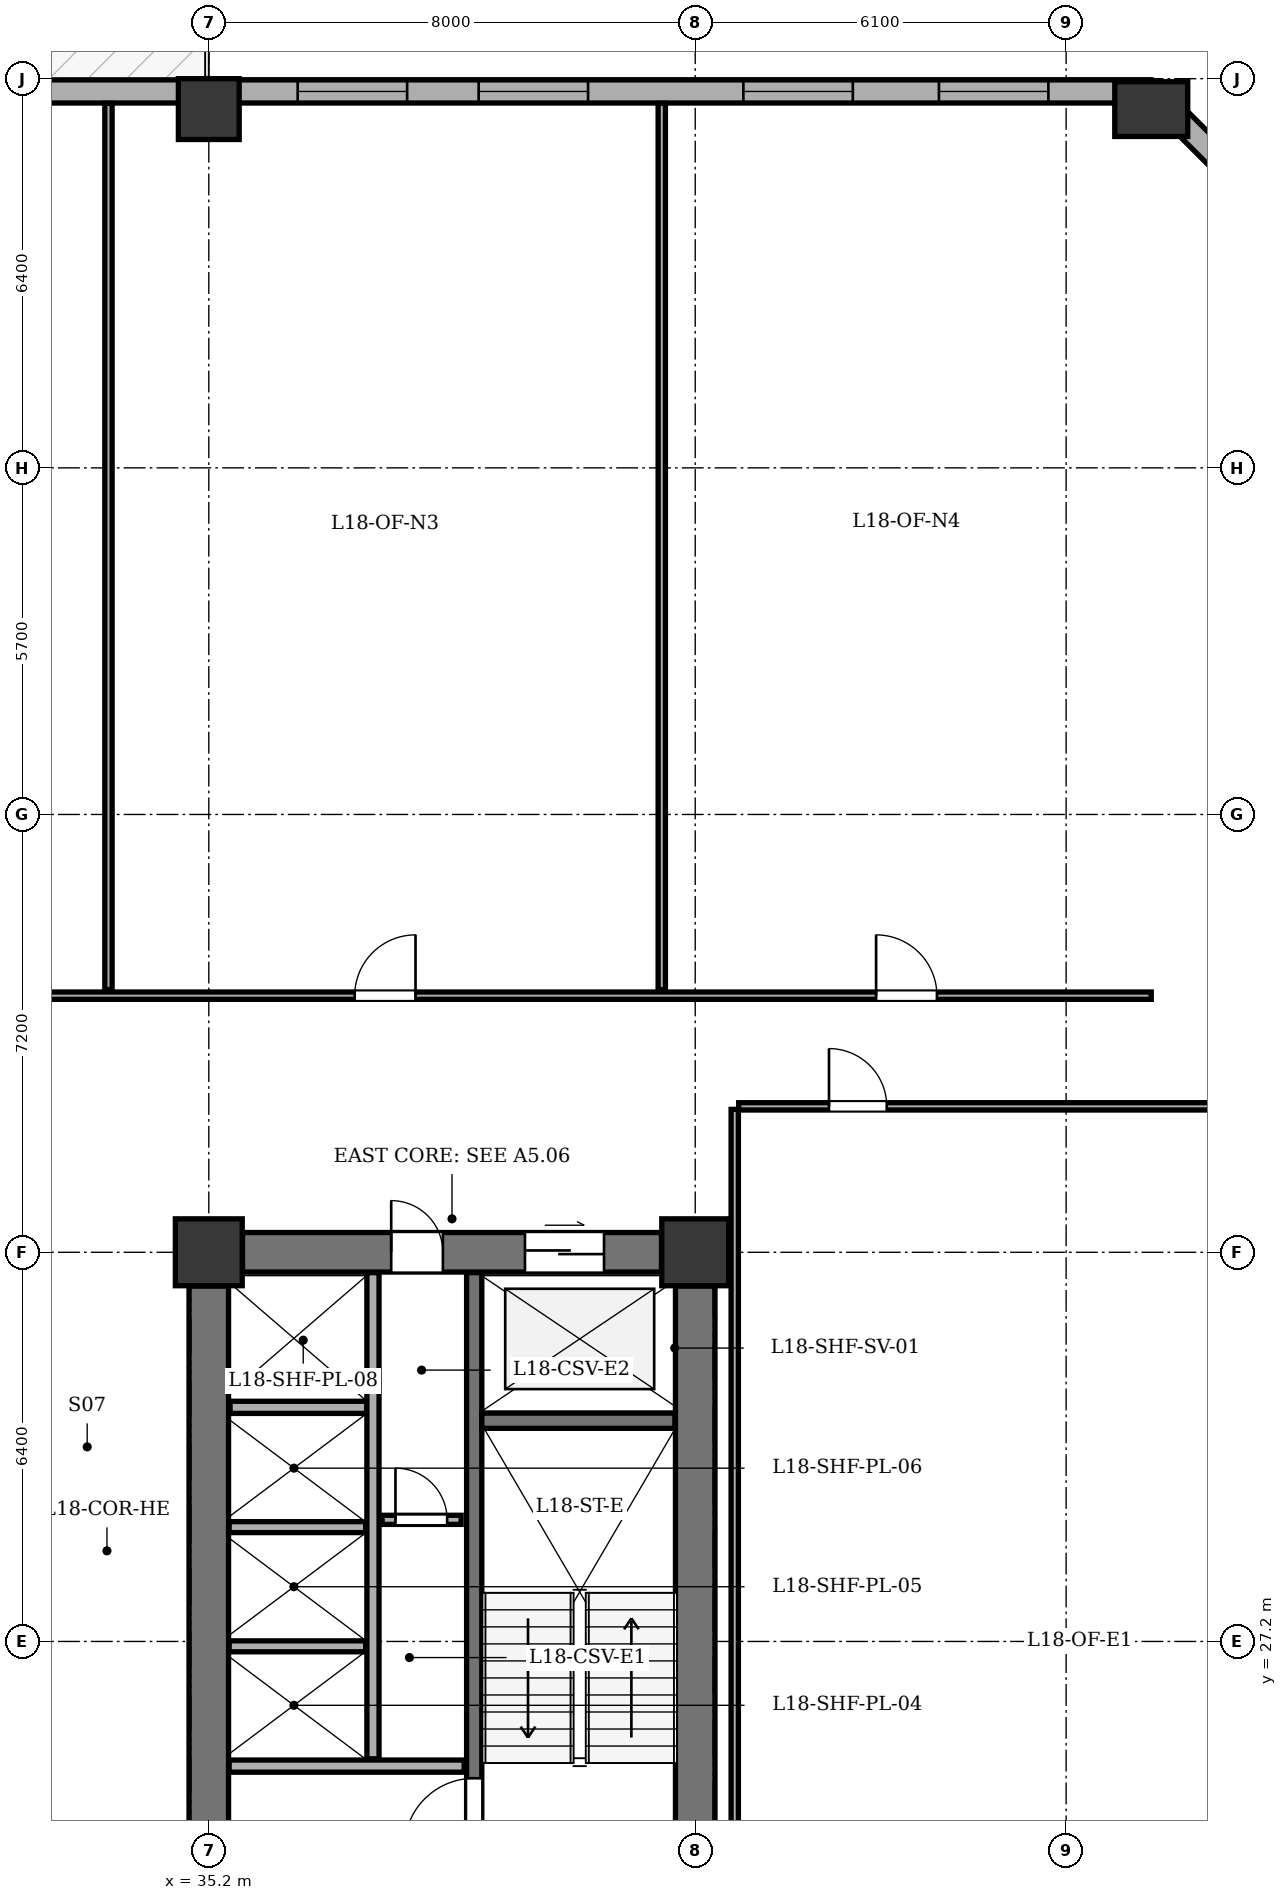
"""IFC4 building model, lengths in metres.
Left out: names, types, materials, properties, quantities, classifications, styles, units other than length and angle.
Written with IfcOpenShell. Run it as: python <this file> out.ifc"""

import sys

from ifc_helpers import new_model, si_unit, direction, frame, frame_2d, origin, origin_2d, place, context, subcontext, project, spatial, rectangle, extrude, element, fill, save


model = new_model("IFC4")
c1 = context("Model", 3, precision=1e-05, world=origin(), true_north=direction((0.0, 1.0)))
c2 = subcontext(c1, "Body", "Model", "MODEL_VIEW")
j1 = project(units=[si_unit("LENGTHUNIT", "METRE"), si_unit("PLANEANGLEUNIT", "RADIAN")], contexts=[c1])
p1 = place(None, origin())
s1 = spatial("IfcSite", under=j1, at=p1, CompositionType="ELEMENT")
p2 = place(p1, origin())
s2 = spatial("IfcBuilding", under=s1, at=p2, CompositionType="ELEMENT")
p3 = place(p2, frame((0.0, 0.0, 75.0)))
s3 = spatial("IfcBuildingStorey", under=s2, at=p3, CompositionType="ELEMENT", Elevation=75.0)
for number, where, z_axis, x_axis in (
    (1, (35.2, 33.6, 0.0), (0.0, 0.0, 1.0), (1.0, 0.0, 0.0)),
    (2, (43.2, 33.6, 0.0), (0.0, 0.0, 1.0), (1.0, 0.0, 0.0)),
):
    element("IfcColumn", number, at=place(p3, frame(where, z_axis=z_axis, x_axis=x_axis)), inside=s3, PredefinedType="COLUMN", context=c2, shape_type="SweptSolid", body=[
        extrude(rectangle(XDim=1.1, YDim=1.1, at=origin_2d()), origin(), (0.0, 0.0, 1.0), 3.9),
    ])
p4 = place(p3, frame((35.2, 52.4, 0.0), z_axis=(0.0, 0.0, 1.0), x_axis=(1.0, 0.0, 0.0)))
e3 = element("IfcColumn", 3, at=p4, inside=s3, PredefinedType="COLUMN", context=c2, shape_type="SweptSolid", body=[
    extrude(rectangle(XDim=1.0, YDim=1.0, at=origin_2d()), origin(), (0.0, 0.0, 1.0), 3.9),
])
p5 = place(p3, frame((50.7, 52.4, 0.0), z_axis=(0.0, 0.0, 1.0), x_axis=(1.0, 0.0, 0.0)))
e4 = element("IfcColumn", 4, at=p5, inside=s3, PredefinedType="COLUMN", context=c2, shape_type="SweptSolid", body=[
    extrude(rectangle(XDim=0.9, YDim=1.2, at=origin_2d()), origin(), (0.0, 0.0, 1.0), 3.9),
])
p6 = place(p3, frame((15.7, 52.69, 0.0), z_axis=(0.0, 0.0, 1.0), x_axis=(1.0, 0.0, 0.0)))
e5 = element("IfcWall", 5, at=p6, inside=s3, PredefinedType="STANDARD", context=c2, shape_type="SweptSolid", body=[
    extrude(rectangle(XDim=35.0, YDim=0.38, at=frame_2d((17.5, 0.0))), origin(), (0.0, 0.0, 1.0), 3.135),
])
p7 = place(p6, frame((15.6, 0.0, 0.0)))
e6 = element("IfcOpeningElement", 6, at=p7, cuts=e5, PredefinedType="OPENING", context=c2, shape_type="SweptSolid", body=[
    extrude(rectangle(XDim=1.0, YDim=2.02, at=frame_2d((0.5, 1.01))), frame((0.0, 0.2, 0.0), z_axis=(0.0, -1.0, 0.0), x_axis=(1.0, 0.0, 0.0)), (0.0, 0.0, 1.0), 0.4),
])
p8 = place(p6, frame((1.7, 0.0, 0.8)))
e7 = element("IfcOpeningElement", 7, at=p8, cuts=e5, PredefinedType="OPENING", context=c2, shape_type="SweptSolid", body=[
    extrude(rectangle(XDim=1.8, YDim=1.9, at=frame_2d((0.9, 0.95))), frame((0.0, 0.2, 0.0), z_axis=(0.0, -1.0, 0.0), x_axis=(1.0, 0.0, 0.0)), (0.0, 0.0, 1.0), 0.4),
])
p9 = place(p6, frame((6.125, 0.0, 0.8)))
e8 = element("IfcOpeningElement", 8, at=p9, cuts=e5, PredefinedType="OPENING", context=c2, shape_type="SweptSolid", body=[
    extrude(rectangle(XDim=1.5, YDim=1.9, at=frame_2d((0.75, 0.95))), frame((0.0, 0.2, 0.0), z_axis=(0.0, -1.0, 0.0), x_axis=(1.0, 0.0, 0.0)), (0.0, 0.0, 1.0), 0.4),
])
p10 = place(p6, frame((9.325, 0.0, 0.8)))
e9 = element("IfcOpeningElement", 9, at=p10, cuts=e5, PredefinedType="OPENING", context=c2, shape_type="SweptSolid", body=[
    extrude(rectangle(XDim=1.8, YDim=1.9, at=frame_2d((0.9, 0.95))), frame((0.0, 0.2, 0.0), z_axis=(0.0, -1.0, 0.0), x_axis=(1.0, 0.0, 0.0)), (0.0, 0.0, 1.0), 0.4),
])
p11 = place(p6, frame((20.962, 0.0, 0.8)))
e10 = element("IfcOpeningElement", 10, at=p11, cuts=e5, PredefinedType="OPENING", context=c2, shape_type="SweptSolid", body=[
    extrude(rectangle(XDim=1.8, YDim=1.9, at=frame_2d((0.9, 0.95))), frame((0.0, 0.2, 0.0), z_axis=(0.0, -1.0, 0.0), x_axis=(1.0, 0.0, 0.0)), (0.0, 0.0, 1.0), 0.4),
])
p12 = place(p6, frame((23.938, 0.0, 0.8)))
e11 = element("IfcOpeningElement", 11, at=p12, cuts=e5, PredefinedType="OPENING", context=c2, shape_type="SweptSolid", body=[
    extrude(rectangle(XDim=1.8, YDim=1.9, at=frame_2d((0.9, 0.95))), frame((0.0, 0.2, 0.0), z_axis=(0.0, -1.0, 0.0), x_axis=(1.0, 0.0, 0.0)), (0.0, 0.0, 1.0), 0.4),
])
p13 = place(p6, frame((28.292, 0.0, 0.8)))
e12 = element("IfcOpeningElement", 12, at=p13, cuts=e5, PredefinedType="OPENING", context=c2, shape_type="SweptSolid", body=[
    extrude(rectangle(XDim=1.8, YDim=1.9, at=frame_2d((0.9, 0.95))), frame((0.0, 0.2, 0.0), z_axis=(0.0, -1.0, 0.0), x_axis=(1.0, 0.0, 0.0)), (0.0, 0.0, 1.0), 0.4),
])
p14 = place(p6, frame((31.508, 0.0, 0.8)))
e13 = element("IfcOpeningElement", 13, at=p14, cuts=e5, PredefinedType="OPENING", context=c2, shape_type="SweptSolid", body=[
    extrude(rectangle(XDim=1.8, YDim=1.9, at=frame_2d((0.9, 0.95))), frame((0.0, 0.2, 0.0), z_axis=(0.0, -1.0, 0.0), x_axis=(1.0, 0.0, 0.0)), (0.0, 0.0, 1.0), 0.4),
])
p15 = place(p3, frame((50.7, 52.69, 0.0), z_axis=(0.0, 0.0, 1.0), x_axis=(0.707106781187, -0.707106781187, 0.0)))
e14 = element("IfcWall", 14, at=p15, inside=s3, PredefinedType="STANDARD", context=c2, shape_type="SweptSolid", body=[
    extrude(rectangle(XDim=6.774, YDim=0.38, at=frame_2d((3.387, 0.0))), origin(), (0.0, 0.0, 1.0), 3.135),
])
p16 = place(p15, frame((2.687, 0.0, 0.8)))
e15 = element("IfcOpeningElement", 15, at=p16, cuts=e14, PredefinedType="OPENING", context=c2, shape_type="SweptSolid", body=[
    extrude(rectangle(XDim=1.4, YDim=1.65, at=frame_2d((0.7, 0.825))), frame((0.0, 0.2, 0.0), z_axis=(0.0, -1.0, 0.0), x_axis=(1.0, 0.0, 0.0)), (0.0, 0.0, 1.0), 0.4),
])
p17 = place(p3, frame((43.2, 21.355, 0.0), z_axis=(0.0, 0.0, 1.0), x_axis=(0.0, 1.0, 0.0)))
e16 = element("IfcWall", 16, at=p17, inside=s3, PredefinedType="SHEAR", context=c2, shape_type="SweptSolid", body=[
    extrude(rectangle(XDim=11.69, YDim=0.65, at=frame_2d((5.845, 0.0))), origin(), (0.0, 0.0, 1.0), 3.6),
])
p18 = place(p3, frame((35.755, 33.6, 0.0), z_axis=(0.0, 0.0, 1.0), x_axis=(1.0, 0.0, 0.0)))
e17 = element("IfcWall", 17, at=p18, inside=s3, PredefinedType="SHEAR", context=c2, shape_type="SweptSolid", body=[
    extrude(rectangle(XDim=6.89, YDim=0.65, at=frame_2d((3.445, 0.0))), origin(), (0.0, 0.0, 1.0), 3.6),
])
p19 = place(p18, frame((4.645, 0.0, 0.0)))
e18 = element("IfcOpeningElement", 18, at=p19, cuts=e17, PredefinedType="OPENING", context=c2, shape_type="SweptSolid", body=[
    extrude(rectangle(XDim=1.3, YDim=2.15, at=frame_2d((0.65, 1.075))), frame((0.0, 0.335, 0.0), z_axis=(0.0, -1.0, 0.0), x_axis=(1.0, 0.0, 0.0)), (0.0, 0.0, 1.0), 0.67),
])
p20 = place(p18, frame((2.445, 0.0, 0.0)))
e19 = element("IfcOpeningElement", 19, at=p20, cuts=e17, PredefinedType="OPENING", context=c2, shape_type="SweptSolid", body=[
    extrude(rectangle(XDim=0.85, YDim=2.02, at=frame_2d((0.425, 1.01))), frame((0.0, 0.335, 0.0), z_axis=(0.0, -1.0, 0.0), x_axis=(1.0, 0.0, 0.0)), (0.0, 0.0, 1.0), 0.67),
])
p21 = place(p3, frame((35.2, 21.355, 0.0), z_axis=(0.0, 0.0, 1.0), x_axis=(0.0, 1.0, 0.0)))
e20 = element("IfcWall", 20, at=p21, inside=s3, PredefinedType="SHEAR", context=c2, shape_type="SweptSolid", body=[
    extrude(rectangle(XDim=11.69, YDim=0.65, at=frame_2d((5.845, 0.0))), origin(), (0.0, 0.0, 1.0), 3.6),
])
p22 = place(p21, frame((1.245, 0.0, 0.0)))
e21 = element("IfcOpeningElement", 21, at=p22, cuts=e20, PredefinedType="OPENING", context=c2, shape_type="SweptSolid", body=[
    extrude(rectangle(XDim=1.2, YDim=2.15, at=frame_2d((0.6, 1.075))), frame((0.0, 0.335, 0.0), z_axis=(0.0, -1.0, 0.0), x_axis=(1.0, 0.0, 0.0)), (0.0, 0.0, 1.0), 0.67),
])
p23 = place(p3, frame((39.565, 21.135, 0.0), z_axis=(0.0, 0.0, 1.0), x_axis=(0.0, 1.0, 0.0)))
e22 = element("IfcWall", 22, at=p23, inside=s3, PredefinedType="SHEAR", context=c2, shape_type="SweptSolid", body=[
    extrude(rectangle(XDim=12.13, YDim=0.25, at=frame_2d((6.065, 0.0))), origin(), (0.0, 0.0, 1.0), 3.6),
])
p24 = place(p23, frame((0.515, 0.0, 0.0)))
e23 = element("IfcOpeningElement", 23, at=p24, cuts=e22, PredefinedType="OPENING", context=c2, shape_type="SweptSolid", body=[
    extrude(rectangle(XDim=1.2, YDim=2.15, at=frame_2d((0.6, 1.075))), frame((0.0, 0.135, 0.0), z_axis=(0.0, -1.0, 0.0), x_axis=(1.0, 0.0, 0.0)), (0.0, 0.0, 1.0), 0.27),
])
p25 = place(p23, frame((2.665, 0.0, 0.0)))
e24 = element("IfcOpeningElement", 24, at=p25, cuts=e22, PredefinedType="OPENING", context=c2, shape_type="SweptSolid", body=[
    extrude(rectangle(XDim=1.15, YDim=2.15, at=frame_2d((0.575, 1.075))), frame((0.0, 0.135, 0.0), z_axis=(0.0, -1.0, 0.0), x_axis=(1.0, 0.0, 0.0)), (0.0, 0.0, 1.0), 0.27),
])
p26 = place(p3, frame((39.69, 30.83, 0.0), z_axis=(0.0, 0.0, 1.0), x_axis=(1.0, 0.0, 0.0)))
e25 = element("IfcWall", 25, at=p26, inside=s3, PredefinedType="SHEAR", context=c2, shape_type="SweptSolid", body=[
    extrude(rectangle(XDim=3.175, YDim=0.25, at=frame_2d((1.587, 0.0))), origin(), (0.0, 0.0, 1.0), 3.6),
])
p27 = place(p3, frame((35.535, 25.15, 0.0), z_axis=(0.0, 0.0, 1.0), x_axis=(1.0, 0.0, 0.0)))
e26 = element("IfcWall", 26, at=p27, inside=s3, PredefinedType="SOLIDWALL", context=c2, shape_type="SweptSolid", body=[
    extrude(rectangle(XDim=3.865, YDim=0.2, at=frame_2d((1.933, 0.0))), origin(), (0.0, 0.0, 1.0), 3.6),
])
p28 = place(p3, frame((35.55, 31.05, 0.0), z_axis=(0.0, 0.0, 1.0), x_axis=(1.0, 0.0, 0.0)))
e27 = element("IfcWall", 27, at=p28, inside=s3, PredefinedType="SOLIDWALL", context=c2, shape_type="SweptSolid", body=[
    extrude(rectangle(XDim=2.25, YDim=0.2, at=frame_2d((1.125, 0.0))), origin(), (0.0, 0.0, 1.0), 3.6),
])
p29 = place(p3, frame((37.9, 25.27, 0.0), z_axis=(0.0, 0.0, 1.0), x_axis=(0.0, 1.0, 0.0)))
e28 = element("IfcWall", 28, at=p29, inside=s3, PredefinedType="SOLIDWALL", context=c2, shape_type="SweptSolid", body=[
    extrude(rectangle(XDim=7.995, YDim=0.2, at=frame_2d((3.998, 0.0))), origin(), (0.0, 0.0, 1.0), 3.6),
])
for number, where, z_axis, x_axis in (
    (29, (35.535, 27.12, 0.0), (0.0, 0.0, 1.0), (1.0, 0.0, 0.0)),
    (30, (35.535, 29.08, 0.0), (0.0, 0.0, 1.0), (1.0, 0.0, 0.0)),
):
    element("IfcWall", number, at=place(p3, frame(where, z_axis=z_axis, x_axis=x_axis)), inside=s3, PredefinedType="PARTITIONING", context=c2, shape_type="SweptSolid", body=[
        extrude(rectangle(XDim=2.245, YDim=0.18, at=frame_2d((1.123, 0.0))), origin(), (0.0, 0.0, 1.0), 3.6),
    ])
p30 = place(p3, frame((38.05, 29.2, 0.0), z_axis=(0.0, 0.0, 1.0), x_axis=(1.0, 0.0, 0.0)))
e31 = element("IfcWall", 31, at=p30, inside=s3, PredefinedType="PARTITIONING", context=c2, shape_type="SweptSolid", body=[
    extrude(rectangle(XDim=1.3, YDim=0.15, at=frame_2d((0.65, 0.0))), origin(), (0.0, 0.0, 1.0), 3.6),
])
p31 = place(p30, frame((0.22, 0.0, 0.0)))
e32 = element("IfcOpeningElement", 32, at=p31, cuts=e31, PredefinedType="OPENING", context=c2, shape_type="SweptSolid", body=[
    extrude(rectangle(XDim=0.85, YDim=2.02, at=frame_2d((0.425, 1.01))), frame((0.0, 0.085, 0.0), z_axis=(0.0, -1.0, 0.0), x_axis=(1.0, 0.0, 0.0)), (0.0, 0.0, 1.0), 0.17),
])
p32 = place(p3, frame((15.7, 37.82, 0.0), z_axis=(0.0, 0.0, 1.0), x_axis=(1.0, 0.0, 0.0)))
e33 = element("IfcWall", 33, at=p32, inside=s3, PredefinedType="PARTITIONING", context=c2, shape_type="SweptSolid", body=[
    extrude(rectangle(XDim=35.0, YDim=0.12, at=frame_2d((17.5, 0.0))), origin(), (0.0, 0.0, 1.0), 3.6),
])
p33 = place(p32, frame((3.7, 0.0, 0.0)))
e34 = element("IfcOpeningElement", 34, at=p33, cuts=e33, PredefinedType="OPENING", context=c2, shape_type="SweptSolid", body=[
    extrude(rectangle(XDim=1.0, YDim=2.1, at=frame_2d((0.5, 1.05))), frame((0.0, 0.07, 0.0), z_axis=(0.0, -1.0, 0.0), x_axis=(1.0, 0.0, 0.0)), (0.0, 0.0, 1.0), 0.14),
])
p34 = place(p32, frame((12.625, 0.0, 0.0)))
e35 = element("IfcOpeningElement", 35, at=p34, cuts=e33, PredefinedType="OPENING", context=c2, shape_type="SweptSolid", body=[
    extrude(rectangle(XDim=1.0, YDim=2.1, at=frame_2d((0.5, 1.05))), frame((0.0, 0.07, 0.0), z_axis=(0.0, -1.0, 0.0), x_axis=(1.0, 0.0, 0.0)), (0.0, 0.0, 1.0), 0.14),
])
p35 = place(p32, frame((21.9, 0.0, 0.0)))
e36 = element("IfcOpeningElement", 36, at=p35, cuts=e33, PredefinedType="OPENING", context=c2, shape_type="SweptSolid", body=[
    extrude(rectangle(XDim=1.0, YDim=2.1, at=frame_2d((0.5, 1.05))), frame((0.0, 0.07, 0.0), z_axis=(0.0, -1.0, 0.0), x_axis=(1.0, 0.0, 0.0)), (0.0, 0.0, 1.0), 0.14),
])
p36 = place(p32, frame((30.475, 0.0, 0.0)))
e37 = element("IfcOpeningElement", 37, at=p36, cuts=e33, PredefinedType="OPENING", context=c2, shape_type="SweptSolid", body=[
    extrude(rectangle(XDim=1.0, YDim=2.1, at=frame_2d((0.5, 1.05))), frame((0.0, 0.07, 0.0), z_axis=(0.0, -1.0, 0.0), x_axis=(1.0, 0.0, 0.0)), (0.0, 0.0, 1.0), 0.14),
])
p37 = place(p3, frame((33.55, 37.92, 0.0), z_axis=(0.0, 0.0, 1.0), x_axis=(0.0, 1.0, 0.0)))
e38 = element("IfcWall", 38, at=p37, inside=s3, PredefinedType="PARTITIONING", context=c2, shape_type="SweptSolid", body=[
    extrude(rectangle(XDim=14.575, YDim=0.12, at=frame_2d((7.288, 0.0))), origin(), (0.0, 0.0, 1.0), 3.135),
])
p38 = place(p3, frame((42.65, 37.92, 0.0), z_axis=(0.0, 0.0, 1.0), x_axis=(0.0, 1.0, 0.0)))
e39 = element("IfcWall", 39, at=p38, inside=s3, PredefinedType="PARTITIONING", context=c2, shape_type="SweptSolid", body=[
    extrude(rectangle(XDim=14.575, YDim=0.12, at=frame_2d((7.288, 0.0))), origin(), (0.0, 0.0, 1.0), 3.6),
])
p39 = place(p3, frame((43.85, 18.45, 0.0), z_axis=(0.0, 0.0, 1.0), x_axis=(0.0, 1.0, 0.0)))
e40 = element("IfcWall", 40, at=p39, inside=s3, PredefinedType="PARTITIONING", context=c2, shape_type="SweptSolid", body=[
    extrude(rectangle(XDim=17.5, YDim=0.12, at=frame_2d((8.75, 0.0))), origin(), (0.0, 0.0, 1.0), 3.6),
])
p40 = place(p3, frame((43.915, 36.0, 0.0), z_axis=(0.0, 0.0, 1.0), x_axis=(1.0, 0.0, 0.0)))
e41 = element("IfcWall", 41, at=p40, inside=s3, PredefinedType="PARTITIONING", context=c2, shape_type="SweptSolid", body=[
    extrude(rectangle(XDim=11.38, YDim=0.12, at=frame_2d((5.69, 0.0))), origin(), (0.0, 0.0, 1.0), 3.6),
])
p41 = place(p40, frame((1.485, 0.0, 0.0)))
e42 = element("IfcOpeningElement", 42, at=p41, cuts=e41, PredefinedType="OPENING", context=c2, shape_type="SweptSolid", body=[
    extrude(rectangle(XDim=0.95, YDim=2.1, at=frame_2d((0.475, 1.05))), frame((0.0, 0.07, 0.0), z_axis=(0.0, -1.0, 0.0), x_axis=(1.0, 0.0, 0.0)), (0.0, 0.0, 1.0), 0.14),
])
p42 = place(p11, origin())
e43 = element("IfcWindow", 43, at=p42, inside=s3, PartitioningType="SINGLE_PANEL", PredefinedType="WINDOW", context=c2, shape_type="SweptSolid", body=[
    extrude(rectangle(XDim=1.8, YDim=1.9, at=frame_2d((0.9, 0.95))), frame((0.0, -0.01, 0.0), z_axis=(0.0, -1.0, 0.0), x_axis=(1.0, 0.0, 0.0)), (0.0, 0.0, 1.0), 0.06),
])
fill(e10, e43)
p43 = place(p12, origin())
e44 = element("IfcWindow", 44, at=p43, inside=s3, PartitioningType="SINGLE_PANEL", PredefinedType="WINDOW", context=c2, shape_type="SweptSolid", body=[
    extrude(rectangle(XDim=1.8, YDim=1.9, at=frame_2d((0.9, 0.95))), frame((0.0, -0.01, 0.0), z_axis=(0.0, -1.0, 0.0), x_axis=(1.0, 0.0, 0.0)), (0.0, 0.0, 1.0), 0.06),
])
fill(e11, e44)
p44 = place(p13, origin())
e45 = element("IfcWindow", 45, at=p44, inside=s3, PartitioningType="SINGLE_PANEL", PredefinedType="WINDOW", context=c2, shape_type="SweptSolid", body=[
    extrude(rectangle(XDim=1.8, YDim=1.9, at=frame_2d((0.9, 0.95))), frame((0.0, -0.01, 0.0), z_axis=(0.0, -1.0, 0.0), x_axis=(1.0, 0.0, 0.0)), (0.0, 0.0, 1.0), 0.06),
])
fill(e12, e45)
p45 = place(p14, origin())
e46 = element("IfcWindow", 46, at=p45, inside=s3, PartitioningType="SINGLE_PANEL", PredefinedType="WINDOW", context=c2, shape_type="SweptSolid", body=[
    extrude(rectangle(XDim=1.8, YDim=1.9, at=frame_2d((0.9, 0.95))), frame((0.0, -0.01, 0.0), z_axis=(0.0, -1.0, 0.0), x_axis=(1.0, 0.0, 0.0)), (0.0, 0.0, 1.0), 0.06),
])
fill(e13, e46)
p46 = place(p19, origin())
e47 = element("IfcDoor", 47, at=p46, inside=s3, OperationType="DOUBLE_DOOR_SLIDING", PredefinedType="DOOR", context=c2, shape_type="SweptSolid", body=[
    extrude(rectangle(XDim=1.3, YDim=2.15, at=frame_2d((0.65, 1.075))), frame((0.0, 0.025, 0.0), z_axis=(0.0, -1.0, 0.0), x_axis=(1.0, 0.0, 0.0)), (0.0, 0.0, 1.0), 0.05),
])
fill(e18, e47)
p47 = place(p20, origin())
e48 = element("IfcDoor", 48, at=p47, inside=s3, OperationType="SINGLE_SWING_LEFT", PredefinedType="DOOR", context=c2, shape_type="SweptSolid", body=[
    extrude(rectangle(XDim=0.85, YDim=2.02, at=frame_2d((0.425, 1.01))), frame((0.0, 0.025, 0.0), z_axis=(0.0, -1.0, 0.0), x_axis=(1.0, 0.0, 0.0)), (0.0, 0.0, 1.0), 0.05),
])
fill(e19, e48)
p48 = place(p25, origin())
e49 = element("IfcDoor", 49, at=p48, inside=s3, OperationType="SINGLE_SWING_LEFT", PredefinedType="DOOR", context=c2, shape_type="SweptSolid", body=[
    extrude(rectangle(XDim=1.15, YDim=2.15, at=frame_2d((0.575, 1.075))), frame((0.0, 0.025, 0.0), z_axis=(0.0, -1.0, 0.0), x_axis=(1.0, 0.0, 0.0)), (0.0, 0.0, 1.0), 0.05),
])
fill(e24, e49)
p49 = place(p31, origin())
e50 = element("IfcDoor", 50, at=p49, inside=s3, OperationType="SINGLE_SWING_LEFT", PredefinedType="DOOR", context=c2, shape_type="SweptSolid", body=[
    extrude(rectangle(XDim=0.85, YDim=2.02, at=frame_2d((0.425, 1.01))), frame((0.0, 0.025, 0.0), z_axis=(0.0, -1.0, 0.0), x_axis=(1.0, 0.0, 0.0)), (0.0, 0.0, 1.0), 0.05),
])
fill(e32, e50)
p50 = place(p35, origin())
e51 = element("IfcDoor", 51, at=p50, inside=s3, OperationType="SINGLE_SWING_RIGHT", PredefinedType="DOOR", context=c2, shape_type="SweptSolid", body=[
    extrude(rectangle(XDim=1.0, YDim=2.1, at=frame_2d((0.5, 1.05))), frame((0.0, 0.025, 0.0), z_axis=(0.0, -1.0, 0.0), x_axis=(1.0, 0.0, 0.0)), (0.0, 0.0, 1.0), 0.05),
])
fill(e36, e51)
p51 = place(p36, origin())
e52 = element("IfcDoor", 52, at=p51, inside=s3, OperationType="SINGLE_SWING_LEFT", PredefinedType="DOOR", context=c2, shape_type="SweptSolid", body=[
    extrude(rectangle(XDim=1.0, YDim=2.1, at=frame_2d((0.5, 1.05))), frame((0.0, 0.025, 0.0), z_axis=(0.0, -1.0, 0.0), x_axis=(1.0, 0.0, 0.0)), (0.0, 0.0, 1.0), 0.05),
])
fill(e37, e52)
p52 = place(p41, origin())
e53 = element("IfcDoor", 53, at=p52, inside=s3, OperationType="SINGLE_SWING_LEFT", PredefinedType="DOOR", context=c2, shape_type="SweptSolid", body=[
    extrude(rectangle(XDim=0.95, YDim=2.1, at=frame_2d((0.475, 1.05))), frame((0.0, 0.025, 0.0), z_axis=(0.0, -1.0, 0.0), x_axis=(1.0, 0.0, 0.0)), (0.0, 0.0, 1.0), 0.05),
])
fill(e42, e53)
save(model, sys.argv[1])
